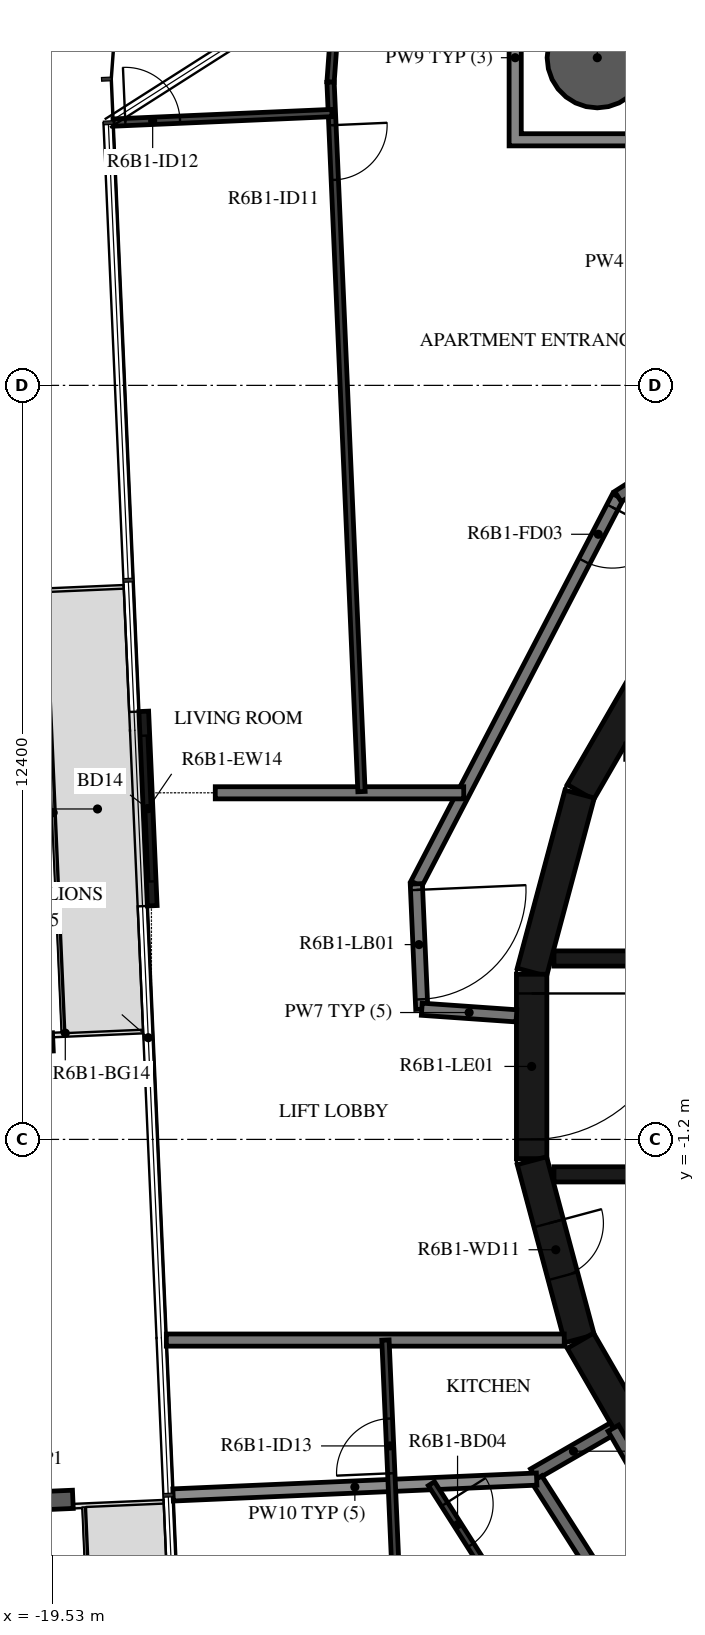
"""IFC4 building model, lengths in metres.
Left out: names, types, materials, properties, quantities, classifications, styles, units other than length and angle.
Written with IfcOpenShell. Run it as: python <this file> out.ifc"""

import sys

from ifc_helpers import new_model, si_unit, direction, frame, frame_2d, origin, origin_2d, place, context, subcontext, project, spatial, polyline, rectangle, hollow_circle, i_section, outline, extrude, element, fill, save


model = new_model("IFC4")
c1 = context("Model", 3, precision=1e-05, world=origin(), true_north=direction((0.0, 1.0)))
c2 = subcontext(c1, "Body", "Model", "MODEL_VIEW")
j1 = project(units=[si_unit("LENGTHUNIT", "METRE"), si_unit("PLANEANGLEUNIT", "RADIAN")], contexts=[c1])
p1 = place(None, origin())
s1 = spatial("IfcSite", under=j1, at=p1, CompositionType="ELEMENT")
p2 = place(p1, origin())
s2 = spatial("IfcBuilding", under=s1, at=p2, CompositionType="ELEMENT")
p3 = place(p2, frame((0.0, 0.0, 237.2)))
s3 = spatial("IfcBuildingStorey", under=s2, at=p3, CompositionType="ELEMENT", Elevation=237.2)
p4 = place(p3, frame((-10.568, 16.588, -0.38), z_axis=(0.0, 0.0, 1.0), x_axis=(1.0, 0.0, 0.0)))
e1 = element("IfcColumn", 1, at=p4, inside=s3, PredefinedType="COLUMN", context=c2, shape_type="SweptSolid", body=[
    extrude(hollow_circle(Radius=0.825, WallThickness=0.04, at=origin_2d()), origin(), (0.0, 0.0, 1.0), 3.5),
])
for number, where, z_axis, x_axis in (
    (2, (-19.97, 0.384, -0.38), (0.0, 0.0, 1.0), (-0.044, 0.999, 0.0)),
    (3, (-19.642, -7.139, -0.38), (0.0, 0.0, 1.0), (-0.044, 0.999, 0.0)),
):
    element("IfcColumn", number, at=place(p3, frame(where, z_axis=z_axis, x_axis=x_axis)), inside=s3, PredefinedType="COLUMN", context=c2, shape_type="SweptSolid", body=[
        extrude(i_section(OverallWidth=0.3, OverallDepth=0.9, WebThickness=0.019, FlangeThickness=0.035, FilletRadius=0.03, at=origin_2d()), origin(), (0.0, 0.0, 1.0), 3.5),
    ])
p5 = place(p3, frame((-18.026, 5.839, 0.0), z_axis=(0.0, 0.0, 1.0), x_axis=(0.043563034632, -0.999050680403, 0.0)))
e4 = element("IfcWall", 4, at=p5, inside=s3, PredefinedType="STANDARD", context=c2, shape_type="SweptSolid", body=[
    extrude(rectangle(XDim=3.2, YDim=0.16, at=frame_2d((1.6, 0.0))), origin(), (0.0, 0.0, 1.0), 3.12),
])
p6 = place(p5, frame((0.4, 0.0, 0.0)))
e5 = element("IfcOpeningElement", 5, at=p6, cuts=e4, PredefinedType="OPENING", context=c2, shape_type="SweptSolid", body=[
    extrude(rectangle(XDim=2.4, YDim=2.4, at=frame_2d((1.2, 1.2))), frame((0.0, 0.09, 0.0), z_axis=(0.0, -1.0, 0.0), x_axis=(1.0, 0.0, 0.0)), (0.0, 0.0, 1.0), 0.18),
])
for number, where, z_axis, x_axis in (
    (6, (-9.329, 7.137, 0.0), (0.0, 0.0, 1.0), (-0.5, -0.866, 0.0)),
    (7, (-10.858, 4.479, 0.0), (0.0, 0.0, 1.0), (-0.259, -0.966, 0.0)),
):
    element("IfcWall", number, at=place(p3, frame(where, z_axis=z_axis, x_axis=x_axis)), inside=s3, PredefinedType="SHEAR", context=c2, shape_type="SweptSolid", body=[
        extrude(rectangle(XDim=3.033, YDim=0.5, at=frame_2d((1.516, 0.0))), origin(), (0.0, 0.0, 1.0), 3.12),
    ])
p7 = place(p3, frame((-11.647, 1.516, 0.0), z_axis=(0.0, 0.0, 1.0), x_axis=(0.0, -1.0, 0.0)))
e8 = element("IfcWall", 8, at=p7, inside=s3, PredefinedType="SHEAR", context=c2, shape_type="SweptSolid", body=[
    extrude(rectangle(XDim=3.033, YDim=0.5, at=frame_2d((1.516, 0.0))), origin(), (0.0, 0.0, 1.0), 3.12),
])
p8 = place(p7, frame((0.316, 0.0, 0.0)))
e9 = element("IfcOpeningElement", 9, at=p8, cuts=e8, PredefinedType="OPENING", context=c2, shape_type="SweptSolid", body=[
    extrude(rectangle(XDim=2.4, YDim=2.1, at=frame_2d((1.2, 1.05))), frame((0.0, 0.26, 0.0), z_axis=(0.0, -1.0, 0.0), x_axis=(1.0, 0.0, 0.0)), (0.0, 0.0, 1.0), 0.52),
])
p9 = place(p3, frame((-11.643, -1.55, 0.0), z_axis=(0.0, 0.0, 1.0), x_axis=(0.258734743916, -0.965948410781, 0.0)))
e10 = element("IfcWall", 10, at=p9, inside=s3, PredefinedType="SHEAR", context=c2, shape_type="SweptSolid", body=[
    extrude(rectangle(XDim=3.033, YDim=0.5, at=frame_2d((1.516, 0.0))), origin(), (0.0, 0.0, 1.0), 3.12),
])
p10 = place(p9, frame((1.066, 0.0, 0.0)))
e11 = element("IfcOpeningElement", 11, at=p10, cuts=e10, PredefinedType="OPENING", context=c2, shape_type="SweptSolid", body=[
    extrude(rectangle(XDim=0.9, YDim=2.1, at=frame_2d((0.45, 1.05))), frame((0.0, 0.26, 0.0), z_axis=(0.0, -1.0, 0.0), x_axis=(1.0, 0.0, 0.0)), (0.0, 0.0, 1.0), 0.52),
])
p11 = place(p3, frame((-10.845, -4.51, 0.0), z_axis=(0.0, 0.0, 1.0), x_axis=(0.500087131594, -0.865975092491, 0.0)))
e12 = element("IfcWall", 12, at=p11, inside=s3, PredefinedType="SHEAR", context=c2, shape_type="SweptSolid", body=[
    extrude(rectangle(XDim=3.033, YDim=0.5, at=frame_2d((1.516, 0.0))), origin(), (0.0, 0.0, 1.0), 3.12),
])
p12 = place(p3, frame((-11.28, 1.775, 0.0), z_axis=(0.0, 0.0, 1.0), x_axis=(1.0, 0.0, 0.0)))
e13 = element("IfcWall", 13, at=p12, inside=s3, PredefinedType="SHEAR", context=c2, shape_type="SweptSolid", body=[
    extrude(rectangle(XDim=14.38, YDim=0.25, at=frame_2d((7.19, 0.0))), origin(), (0.0, 0.0, 1.0), 3.12),
])
p13 = place(p12, frame((10.73, 0.0, 0.0)))
e14 = element("IfcOpeningElement", 14, at=p13, cuts=e13, PredefinedType="OPENING", context=c2, shape_type="SweptSolid", body=[
    extrude(rectangle(XDim=1.1, YDim=2.1, at=frame_2d((0.55, 1.05))), frame((0.0, 0.135, 0.0), z_axis=(0.0, -1.0, 0.0), x_axis=(1.0, 0.0, 0.0)), (0.0, 0.0, 1.0), 0.27),
])
p14 = place(p12, frame((12.88, 0.0, 0.0)))
e15 = element("IfcOpeningElement", 15, at=p14, cuts=e13, PredefinedType="OPENING", context=c2, shape_type="SweptSolid", body=[
    extrude(rectangle(XDim=1.1, YDim=2.1, at=frame_2d((0.55, 1.05))), frame((0.0, 0.135, 0.0), z_axis=(0.0, -1.0, 0.0), x_axis=(1.0, 0.0, 0.0)), (0.0, 0.0, 1.0), 0.27),
])
p15 = place(p12, frame((3.305, 0.0, 0.0)))
e16 = element("IfcOpeningElement", 16, at=p15, cuts=e13, PredefinedType="OPENING", context=c2, shape_type="SweptSolid", body=[
    extrude(rectangle(XDim=0.9, YDim=2.1, at=frame_2d((0.45, 1.05))), frame((0.0, 0.135, 0.0), z_axis=(0.0, -1.0, 0.0), x_axis=(1.0, 0.0, 0.0)), (0.0, 0.0, 1.0), 0.27),
])
p16 = place(p12, frame((7.605, 0.0, 0.0)))
e17 = element("IfcOpeningElement", 17, at=p16, cuts=e13, PredefinedType="OPENING", context=c2, shape_type="SweptSolid", body=[
    extrude(rectangle(XDim=0.9, YDim=2.1, at=frame_2d((0.45, 1.05))), frame((0.0, 0.135, 0.0), z_axis=(0.0, -1.0, 0.0), x_axis=(1.0, 0.0, 0.0)), (0.0, 0.0, 1.0), 0.27),
])
p17 = place(p3, frame((-11.28, -1.775, 0.0), z_axis=(0.0, 0.0, 1.0), x_axis=(1.0, 0.0, 0.0)))
e18 = element("IfcWall", 18, at=p17, inside=s3, PredefinedType="SHEAR", context=c2, shape_type="SweptSolid", body=[
    extrude(rectangle(XDim=14.38, YDim=0.25, at=frame_2d((7.19, 0.0))), origin(), (0.0, 0.0, 1.0), 3.12),
])
p18 = place(p17, frame((12.88, 0.0, 0.0)))
e19 = element("IfcOpeningElement", 19, at=p18, cuts=e18, PredefinedType="OPENING", context=c2, shape_type="SweptSolid", body=[
    extrude(rectangle(XDim=1.1, YDim=2.1, at=frame_2d((0.55, 1.05))), frame((0.0, 0.135, 0.0), z_axis=(0.0, -1.0, 0.0), x_axis=(1.0, 0.0, 0.0)), (0.0, 0.0, 1.0), 0.27),
])
p19 = place(p17, frame((6.53, 0.0, 0.0)))
e20 = element("IfcOpeningElement", 20, at=p19, cuts=e18, PredefinedType="OPENING", context=c2, shape_type="SweptSolid", body=[
    extrude(rectangle(XDim=0.9, YDim=2.1, at=frame_2d((0.45, 1.05))), frame((0.0, 0.135, 0.0), z_axis=(0.0, -1.0, 0.0), x_axis=(1.0, 0.0, 0.0)), (0.0, 0.0, 1.0), 0.27),
])
p20 = place(p17, frame((8.68, 0.0, 0.0)))
e21 = element("IfcOpeningElement", 21, at=p20, cuts=e18, PredefinedType="OPENING", context=c2, shape_type="SweptSolid", body=[
    extrude(rectangle(XDim=0.9, YDim=2.1, at=frame_2d((0.45, 1.05))), frame((0.0, 0.135, 0.0), z_axis=(0.0, -1.0, 0.0), x_axis=(1.0, 0.0, 0.0)), (0.0, 0.0, 1.0), 0.27),
])
p21 = place(p17, frame((10.83, 0.0, 0.0)))
e22 = element("IfcOpeningElement", 22, at=p21, cuts=e18, PredefinedType="OPENING", context=c2, shape_type="SweptSolid", body=[
    extrude(rectangle(XDim=0.9, YDim=2.1, at=frame_2d((0.45, 1.05))), frame((0.0, 0.135, 0.0), z_axis=(0.0, -1.0, 0.0), x_axis=(1.0, 0.0, 0.0)), (0.0, 0.0, 1.0), 0.27),
])
p22 = place(p3, frame((-10.228, 9.372, 0.0), z_axis=(0.0, 0.0, 1.0), x_axis=(-0.461759464021, -0.887005184532, 0.0)))
e23 = element("IfcWall", 23, at=p22, inside=s3, PredefinedType="STANDARD", context=c2, shape_type="SweptSolid", body=[
    extrude(rectangle(XDim=7.181, YDim=0.2, at=frame_2d((3.591, 0.0))), origin(), (0.0, 0.0, 1.0), 3.12),
])
p23 = place(p22, frame((0.2, 0.0, 0.0)))
e24 = element("IfcOpeningElement", 24, at=p23, cuts=e23, PredefinedType="OPENING", context=c2, shape_type="SweptSolid", body=[
    extrude(rectangle(XDim=1.0, YDim=2.1, at=frame_2d((0.5, 1.05))), frame((0.0, 0.11, 0.0), z_axis=(0.0, -1.0, 0.0), x_axis=(1.0, 0.0, 0.0)), (0.0, 0.0, 1.0), 0.22),
])
p24 = place(p3, frame((-13.544, 3.003, 0.0), z_axis=(0.0, 0.0, 1.0), x_axis=(0.043652842459, -0.99904676034, 0.0)))
e25 = element("IfcWall", 25, at=p24, inside=s3, PredefinedType="STANDARD", context=c2, shape_type="SweptSolid", body=[
    extrude(rectangle(XDim=2.064, YDim=0.2, at=frame_2d((1.032, 0.0))), origin(), (0.0, 0.0, 1.0), 3.12),
])
p25 = place(p24, frame((0.1, 0.0, 0.0)))
e26 = element("IfcOpeningElement", 26, at=p25, cuts=e25, PredefinedType="OPENING", context=c2, shape_type="SweptSolid", body=[
    extrude(rectangle(XDim=1.8, YDim=2.1, at=frame_2d((0.9, 1.05))), frame((0.0, 0.11, 0.0), z_axis=(0.0, -1.0, 0.0), x_axis=(1.0, 0.0, 0.0)), (0.0, 0.0, 1.0), 0.22),
])
p26 = place(p3, frame((-13.454, 0.941, 0.0), z_axis=(0.0, 0.0, 1.0), x_axis=(0.99755155062, -0.069934997354, 0.0)))
e27 = element("IfcWall", 27, at=p26, inside=s3, PredefinedType="STANDARD", context=c2, shape_type="SweptSolid", body=[
    extrude(rectangle(XDim=1.561, YDim=0.2, at=frame_2d((0.78, 0.0))), origin(), (0.0, 0.0, 1.0), 3.12),
])
p27 = place(p3, frame((-4.172, 13.231, 0.0), z_axis=(0.0, 0.0, 1.0), x_axis=(-0.843388394728, -0.537304397561, 0.0)))
e28 = element("IfcWall", 28, at=p27, inside=s3, PredefinedType="STANDARD", context=c2, shape_type="SweptSolid", body=[
    extrude(rectangle(XDim=7.181, YDim=0.2, at=frame_2d((3.59, 0.0))), origin(), (0.0, 0.0, 1.0), 3.12),
])
p28 = place(p3, frame((-10.303, -5.949, 0.0), z_axis=(0.0, 0.0, 1.0), x_axis=(-0.866043382451, -0.499968858743, 0.0)))
e29 = element("IfcWall", 29, at=p28, inside=s3, PredefinedType="STANDARD", context=c2, shape_type="SweptSolid", body=[
    extrude(rectangle(XDim=1.515, YDim=0.2, at=frame_2d((0.758, 0.0))), origin(), (0.0, 0.0, 1.0), 3.12),
])
p29 = place(p3, frame((-9.52, -7.305, 0.0), z_axis=(0.0, 0.0, 1.0), x_axis=(-0.500028278809, 0.866009076391, 0.0)))
e30 = element("IfcWall", 30, at=p29, inside=s3, PredefinedType="STANDARD", context=c2, shape_type="SweptSolid", body=[
    extrude(rectangle(XDim=1.566, YDim=0.2, at=frame_2d((0.783, 0.0))), origin(), (0.0, 0.0, 1.0), 3.12),
])
p30 = place(p3, frame((-11.565, -6.786, 0.0), z_axis=(0.0, 0.0, 1.0), x_axis=(0.537297327359, -0.843392898958, 0.0)))
e31 = element("IfcWall", 31, at=p30, inside=s3, PredefinedType="STANDARD", context=c2, shape_type="SweptSolid", body=[
    extrude(rectangle(XDim=4.081, YDim=0.2, at=frame_2d((2.041, 0.0))), origin(), (0.0, 0.0, 1.0), 3.12),
])
p31 = place(p3, frame((-12.764, 4.5, 0.0), z_axis=(0.0, 0.0, 1.0), x_axis=(-1.0, 0.0, 0.0)))
e32 = element("IfcWall", 32, at=p31, inside=s3, PredefinedType="STANDARD", context=c2, shape_type="SweptSolid", body=[
    extrude(rectangle(XDim=4.086, YDim=0.2, at=frame_2d((2.043, 0.0))), origin(), (0.0, 0.0, 1.0), 3.12),
])
p32 = place(p3, frame((-17.655, -4.5, 0.0), z_axis=(0.0, 0.0, 1.0), x_axis=(1.0, 0.0, 0.0)))
e33 = element("IfcWall", 33, at=p32, inside=s3, PredefinedType="STANDARD", context=c2, shape_type="SweptSolid", body=[
    extrude(rectangle(XDim=6.543, YDim=0.2, at=frame_2d((3.272, 0.0))), origin(), (0.0, 0.0, 1.0), 3.12),
])
p33 = place(p3, frame((-17.544, -7.047, 0.0), z_axis=(0.0, 0.0, 1.0), x_axis=(0.999046743906, 0.043653218555, 0.0)))
e34 = element("IfcWall", 34, at=p33, inside=s3, PredefinedType="STANDARD", context=c2, shape_type="SweptSolid", body=[
    extrude(rectangle(XDim=5.984, YDim=0.2, at=frame_2d((2.992, 0.0))), origin(), (0.0, 0.0, 1.0), 2.73),
])
p34 = place(p3, frame((-14.865, 17.411, 0.0), z_axis=(0.0, 0.0, 1.0), x_axis=(-0.072618457011, -0.997359794508, 0.0)))
e35 = element("IfcWall", 35, at=p34, inside=s3, PredefinedType="PARTITIONING", context=c2, shape_type="SweptSolid", body=[
    extrude(rectangle(XDim=1.227, YDim=0.12, at=frame_2d((0.614, 0.0))), origin(), (0.0, 0.0, 1.0), 3.12),
])
p35 = place(p3, frame((-14.955, 16.187, 0.0), z_axis=(0.0, 0.0, 1.0), x_axis=(0.04360777668, -0.999048728448, 0.0)))
e36 = element("IfcWall", 36, at=p35, inside=s3, PredefinedType="PARTITIONING", context=c2, shape_type="SweptSolid", body=[
    extrude(rectangle(XDim=11.679, YDim=0.12, at=frame_2d((5.839, 0.0))), origin(), (0.0, 0.0, 1.0), 3.12),
])
p36 = place(p35, frame((0.709, 0.0, 0.0)))
e37 = element("IfcOpeningElement", 37, at=p36, cuts=e36, PredefinedType="OPENING", context=c2, shape_type="SweptSolid", body=[
    extrude(rectangle(XDim=0.9, YDim=2.1, at=frame_2d((0.45, 1.05))), frame((0.0, 0.07, 0.0), z_axis=(0.0, -1.0, 0.0), x_axis=(1.0, 0.0, 0.0)), (0.0, 0.0, 1.0), 0.14),
])
p37 = place(p3, frame((-18.529, 15.522, 0.0), z_axis=(0.0, 0.0, 1.0), x_axis=(0.999048722018, 0.043607923987, 0.0)))
e38 = element("IfcWall", 38, at=p37, inside=s3, PredefinedType="PARTITIONING", context=c2, shape_type="SweptSolid", body=[
    extrude(rectangle(XDim=3.6, YDim=0.12, at=frame_2d((1.8, 0.0))), origin(), (0.0, 0.0, 1.0), 2.73),
])
p38 = place(p37, frame((0.2, 0.0, 0.0)))
e39 = element("IfcOpeningElement", 39, at=p38, cuts=e38, PredefinedType="OPENING", context=c2, shape_type="SweptSolid", body=[
    extrude(rectangle(XDim=0.9, YDim=2.1, at=frame_2d((0.45, 1.05))), frame((0.0, 0.07, 0.0), z_axis=(0.0, -1.0, 0.0), x_axis=(1.0, 0.0, 0.0)), (0.0, 0.0, 1.0), 0.14),
])
p39 = place(p3, frame((-13.487, -17.429, 0.0), z_axis=(0.0, 0.0, 1.0), x_axis=(-0.043617336945, 0.999048311103, 0.0)))
e40 = element("IfcWall", 40, at=p39, inside=s3, PredefinedType="PARTITIONING", context=c2, shape_type="SweptSolid", body=[
    extrude(rectangle(XDim=12.941, YDim=0.12, at=frame_2d((6.47, 0.0))), origin(), (0.0, 0.0, 1.0), 3.12),
])
p40 = place(p39, frame((10.749, 0.0, 0.0)))
e41 = element("IfcOpeningElement", 41, at=p40, cuts=e40, PredefinedType="OPENING", context=c2, shape_type="SweptSolid", body=[
    extrude(rectangle(XDim=0.9, YDim=2.1, at=frame_2d((0.45, 1.05))), frame((0.0, 0.07, 0.0), z_axis=(0.0, -1.0, 0.0), x_axis=(1.0, 0.0, 0.0)), (0.0, 0.0, 1.0), 0.14),
])
p41 = place(p39, frame((0.892, 0.0, 0.0)))
e42 = element("IfcOpeningElement", 42, at=p41, cuts=e40, PredefinedType="OPENING", context=c2, shape_type="SweptSolid", body=[
    extrude(rectangle(XDim=0.9, YDim=2.1, at=frame_2d((0.45, 1.05))), frame((0.0, 0.07, 0.0), z_axis=(0.0, -1.0, 0.0), x_axis=(1.0, 0.0, 0.0)), (0.0, 0.0, 1.0), 0.14),
])
p42 = place(p3, frame((-13.295, -6.862, 0.0), z_axis=(0.0, 0.0, 1.0), x_axis=(0.537285929223, -0.84340016022, 0.0)))
e43 = element("IfcWall", 43, at=p42, inside=s3, PredefinedType="PARTITIONING", context=c2, shape_type="SweptSolid", body=[
    extrude(rectangle(XDim=5.349, YDim=0.12, at=frame_2d((2.675, 0.0))), origin(), (0.0, 0.0, 1.0), 3.12),
])
p43 = place(p42, frame((0.4, 0.0, 0.0)))
e44 = element("IfcOpeningElement", 44, at=p43, cuts=e43, PredefinedType="OPENING", context=c2, shape_type="SweptSolid", body=[
    extrude(rectangle(XDim=0.8, YDim=2.1, at=frame_2d((0.4, 1.05))), frame((0.0, 0.07, 0.0), z_axis=(0.0, -1.0, 0.0), x_axis=(1.0, 0.0, 0.0)), (0.0, 0.0, 1.0), 0.14),
])
p44 = place(p3, origin())
e45 = element("IfcWall", 45, at=p44, inside=s3, PredefinedType="STANDARD", context=c2, shape_type="SweptSolid", body=[
    extrude(outline(polyline([(-9.118, 18.038), (-9.118, 15.138), (-12.018, 15.138), (-12.018, 18.038), (-9.118, 18.038)]), holes=[polyline([(-11.818, 15.338), (-9.318, 15.338), (-9.318, 17.838), (-11.818, 17.838), (-11.818, 15.338)])]), origin(), (0.0, 0.0, 1.0), 3.12),
])
p45 = place(p6, origin())
e46 = element("IfcDoor", 46, at=p45, inside=s3, OperationType="DOUBLE_DOOR_SLIDING", PredefinedType="DOOR", context=c2, shape_type="SweptSolid", body=[
    extrude(rectangle(XDim=2.4, YDim=2.4, at=frame_2d((1.2, 1.2))), frame((0.0, 0.025, 0.0), z_axis=(0.0, -1.0, 0.0), x_axis=(1.0, 0.0, 0.0)), (0.0, 0.0, 1.0), 0.05),
])
fill(e5, e46)
p46 = place(p8, origin())
e47 = element("IfcDoor", 47, at=p46, inside=s3, OperationType="DOUBLE_DOOR_SINGLE_SWING", PredefinedType="DOOR", context=c2, shape_type="SweptSolid", body=[
    extrude(rectangle(XDim=2.4, YDim=2.1, at=frame_2d((1.2, 1.05))), frame((0.0, 0.025, 0.0), z_axis=(0.0, -1.0, 0.0), x_axis=(1.0, 0.0, 0.0)), (0.0, 0.0, 1.0), 0.05),
])
fill(e9, e47)
p47 = place(p10, origin())
e48 = element("IfcDoor", 48, at=p47, inside=s3, OperationType="SINGLE_SWING_LEFT", PredefinedType="DOOR", context=c2, shape_type="SweptSolid", body=[
    extrude(rectangle(XDim=0.9, YDim=2.1, at=frame_2d((0.45, 1.05))), frame((0.0, 0.025, 0.0), z_axis=(0.0, -1.0, 0.0), x_axis=(1.0, 0.0, 0.0)), (0.0, 0.0, 1.0), 0.05),
])
fill(e11, e48)
p48 = place(p23, origin())
e49 = element("IfcDoor", 49, at=p48, inside=s3, OperationType="SINGLE_SWING_LEFT", PredefinedType="DOOR", context=c2, shape_type="SweptSolid", body=[
    extrude(rectangle(XDim=1.0, YDim=2.1, at=frame_2d((0.5, 1.05))), frame((0.0, 0.025, 0.0), z_axis=(0.0, -1.0, 0.0), x_axis=(1.0, 0.0, 0.0)), (0.0, 0.0, 1.0), 0.05),
])
fill(e24, e49)
p49 = place(p36, origin())
e50 = element("IfcDoor", 50, at=p49, inside=s3, OperationType="SINGLE_SWING_LEFT", PredefinedType="DOOR", context=c2, shape_type="SweptSolid", body=[
    extrude(rectangle(XDim=0.9, YDim=2.1, at=frame_2d((0.45, 1.05))), frame((0.0, 0.025, 0.0), z_axis=(0.0, -1.0, 0.0), x_axis=(1.0, 0.0, 0.0)), (0.0, 0.0, 1.0), 0.05),
])
fill(e37, e50)
p50 = place(p38, origin())
e51 = element("IfcDoor", 51, at=p50, inside=s3, OperationType="SINGLE_SWING_LEFT", PredefinedType="DOOR", context=c2, shape_type="SweptSolid", body=[
    extrude(rectangle(XDim=0.9, YDim=2.1, at=frame_2d((0.45, 1.05))), frame((0.0, 0.025, 0.0), z_axis=(0.0, -1.0, 0.0), x_axis=(1.0, 0.0, 0.0)), (0.0, 0.0, 1.0), 0.05),
])
fill(e39, e51)
p51 = place(p40, origin())
e52 = element("IfcDoor", 52, at=p51, inside=s3, OperationType="SINGLE_SWING_LEFT", PredefinedType="DOOR", context=c2, shape_type="SweptSolid", body=[
    extrude(rectangle(XDim=0.9, YDim=2.1, at=frame_2d((0.45, 1.05))), frame((0.0, 0.025, 0.0), z_axis=(0.0, -1.0, 0.0), x_axis=(1.0, 0.0, 0.0)), (0.0, 0.0, 1.0), 0.05),
])
fill(e41, e52)
p52 = place(p43, origin())
e53 = element("IfcDoor", 53, at=p52, inside=s3, OperationType="SINGLE_SWING_RIGHT", PredefinedType="DOOR", context=c2, shape_type="SweptSolid", body=[
    extrude(rectangle(XDim=0.8, YDim=2.1, at=frame_2d((0.4, 1.05))), frame((0.0, 0.025, 0.0), z_axis=(0.0, -1.0, 0.0), x_axis=(1.0, 0.0, 0.0)), (0.0, 0.0, 1.0), 0.05),
])
fill(e44, e53)
p53 = place(p25, origin())
e54 = element("IfcDoor", 54, at=p53, inside=s3, OperationType="DOUBLE_DOOR_SINGLE_SWING", PredefinedType="DOOR", context=c2, shape_type="SweptSolid", body=[
    extrude(rectangle(XDim=1.8, YDim=2.1, at=frame_2d((0.9, 1.05))), frame((0.0, 0.025, 0.0), z_axis=(0.0, -1.0, 0.0), x_axis=(1.0, 0.0, 0.0)), (0.0, 0.0, 1.0), 0.05),
])
fill(e26, e54)
save(model, sys.argv[1])
